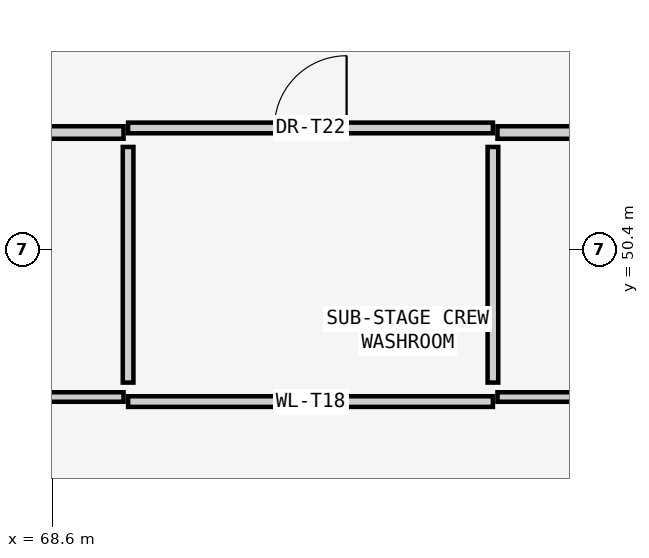
"""IFC4 building model, lengths in metres.
Left out: names, types, materials, properties, quantities, classifications, styles, units other than length and angle.
Written with IfcOpenShell. Run it as: python <this file> out.ifc"""

import sys

from ifc_helpers import new_model, si_unit, direction, frame, frame_2d, origin, place, context, subcontext, project, spatial, rectangle, extrude, element, fill, save


model = new_model("IFC4")
c1 = context("Model", 3, precision=1e-05, world=origin(), true_north=direction((0.0, 1.0)))
c2 = subcontext(c1, "Body", "Model", "MODEL_VIEW")
j1 = project(units=[si_unit("LENGTHUNIT", "METRE"), si_unit("PLANEANGLEUNIT", "RADIAN")], contexts=[c1])
p1 = place(None, origin())
s1 = spatial("IfcSite", under=j1, at=p1, CompositionType="ELEMENT")
p2 = place(p1, origin())
s2 = spatial("IfcBuilding", under=s1, at=p2, CompositionType="ELEMENT")
p3 = place(p2, frame((0.0, 0.0, -9.6)))
s3 = spatial("IfcBuildingStorey", under=s2, at=p3, CompositionType="ELEMENT", Elevation=-9.6)
p4 = place(p3, frame((69.6, 48.4, 0.0), z_axis=(0.0, 0.0, 1.0), x_axis=(1.0, 0.0, 0.0)))
e1 = element("IfcWall", 1, at=p4, inside=s3, PredefinedType="PARTITIONING", context=c2, shape_type="SweptSolid", body=[
    extrude(rectangle(XDim=4.8, YDim=0.14, at=frame_2d((2.4, 0.0))), origin(), (0.0, 0.0, 1.0), 4.32),
])
p5 = place(p3, frame((69.6, 52.0, 0.0), z_axis=(0.0, 0.0, 1.0), x_axis=(1.0, 0.0, 0.0)))
e2 = element("IfcWall", 2, at=p5, inside=s3, PredefinedType="PARTITIONING", context=c2, shape_type="SweptSolid", body=[
    extrude(rectangle(XDim=4.8, YDim=0.14, at=frame_2d((2.4, 0.0))), origin(), (0.0, 0.0, 1.0), 4.32),
])
p6 = place(p5, frame((1.925, 0.0, 0.0)))
e3 = element("IfcOpeningElement", 3, at=p6, cuts=e2, PredefinedType="OPENING", context=c2, shape_type="SweptSolid", body=[
    extrude(rectangle(XDim=0.95, YDim=2.15, at=frame_2d((0.475, 1.075))), frame((0.0, 0.08, 0.0), z_axis=(0.0, -1.0, 0.0), x_axis=(1.0, 0.0, 0.0)), (0.0, 0.0, 1.0), 0.16),
])
for number, where, z_axis, x_axis in (
    (4, (69.6, 48.65, 0.0), (0.0, 0.0, 1.0), (0.0, 1.0, 0.0)),
    (5, (74.4, 48.65, 0.0), (0.0, 0.0, 1.0), (0.0, 1.0, 0.0)),
):
    element("IfcWall", number, at=place(p3, frame(where, z_axis=z_axis, x_axis=x_axis)), inside=s3, PredefinedType="PARTITIONING", context=c2, shape_type="SweptSolid", body=[
        extrude(rectangle(XDim=3.1, YDim=0.14, at=frame_2d((1.55, 0.0))), origin(), (0.0, 0.0, 1.0), 4.32),
    ])
p7 = place(p3, frame((74.46, 51.94, 0.0), z_axis=(0.0, 0.0, 1.0), x_axis=(1.0, 0.0, 0.0)))
e6 = element("IfcWall", 6, at=p7, inside=s3, PredefinedType="PARTITIONING", context=c2, shape_type="SweptSolid", body=[
    extrude(rectangle(XDim=5.08, YDim=0.165, at=frame_2d((2.54, 0.0))), origin(), (0.0, 0.0, 1.0), 4.35),
])
p8 = place(p3, frame((51.8, 51.94, 0.0), z_axis=(0.0, 0.0, 1.0), x_axis=(1.0, 0.0, 0.0)))
e7 = element("IfcWall", 7, at=p8, inside=s3, PredefinedType="PARTITIONING", context=c2, shape_type="SweptSolid", body=[
    extrude(rectangle(XDim=17.74, YDim=0.165, at=frame_2d((8.87, 0.0))), origin(), (0.0, 0.0, 1.0), 4.35),
])
p9 = place(p8, frame((8.27, 0.0, 0.0)))
e8 = element("IfcOpeningElement", 8, at=p9, cuts=e7, PredefinedType="OPENING", context=c2, shape_type="SweptSolid", body=[
    extrude(rectangle(XDim=1.2, YDim=2.2, at=frame_2d((0.6, 1.1))), frame((0.0, 0.093, 0.0), z_axis=(0.0, -1.0, 0.0), x_axis=(1.0, 0.0, 0.0)), (0.0, 0.0, 1.0), 0.185),
])
p10 = place(p3, frame((74.46, 48.46, 0.0), z_axis=(0.0, 0.0, 1.0), x_axis=(1.0, 0.0, 0.0)))
e9 = element("IfcWall", 9, at=p10, inside=s3, PredefinedType="PARTITIONING", context=c2, shape_type="SweptSolid", body=[
    extrude(rectangle(XDim=60.03, YDim=0.125, at=frame_2d((30.015, 0.0))), origin(), (0.0, 0.0, 1.0), 4.35),
])
p11 = place(p3, frame((52.11, 48.46, 0.0), z_axis=(0.0, 0.0, 1.0), x_axis=(1.0, 0.0, 0.0)))
e10 = element("IfcWall", 10, at=p11, inside=s3, PredefinedType="PARTITIONING", context=c2, shape_type="SweptSolid", body=[
    extrude(rectangle(XDim=17.43, YDim=0.125, at=frame_2d((8.715, 0.0))), origin(), (0.0, 0.0, 1.0), 4.35),
])
p12 = place(p6, origin())
e11 = element("IfcDoor", 11, at=p12, inside=s3, OperationType="SINGLE_SWING_RIGHT", PredefinedType="DOOR", context=c2, shape_type="SweptSolid", body=[
    extrude(rectangle(XDim=0.95, YDim=2.15, at=frame_2d((0.475, 1.075))), frame((0.0, 0.025, 0.0), z_axis=(0.0, -1.0, 0.0), x_axis=(1.0, 0.0, 0.0)), (0.0, 0.0, 1.0), 0.05),
])
fill(e3, e11)
save(model, sys.argv[1])
